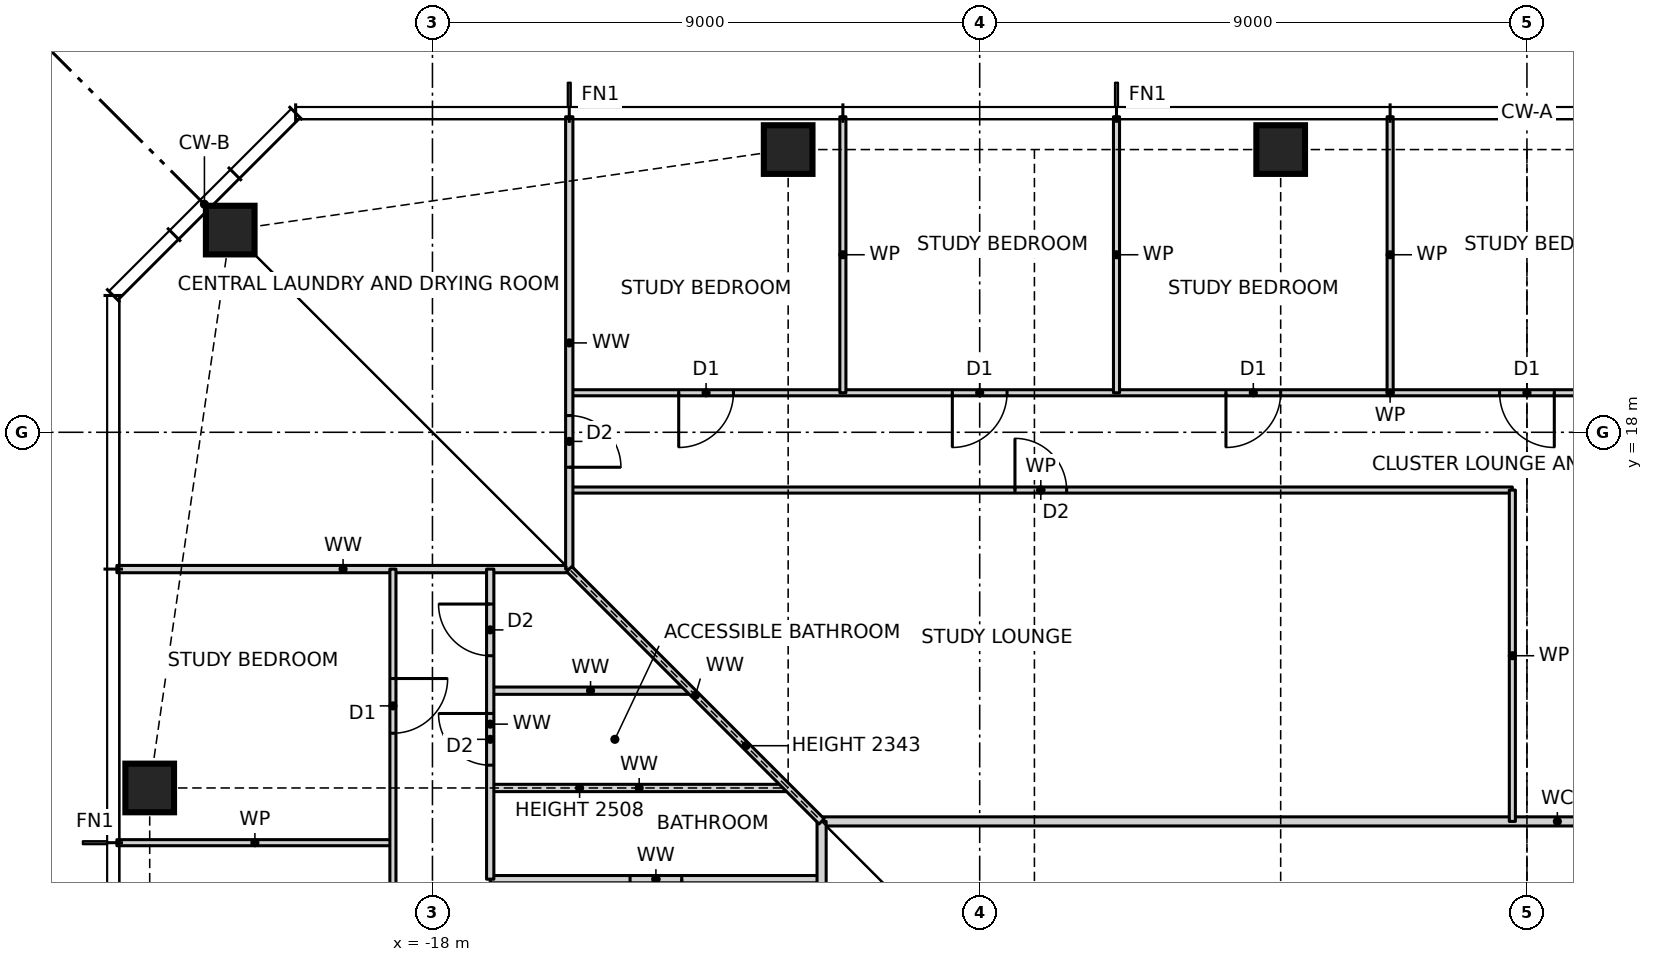
"""IFC4 building model, lengths in metres.
Left out: names, types, materials, properties, quantities, classifications, styles, units other than length and angle.
Written with IfcOpenShell. Run it as: python <this file> out.ifc"""

import sys

from ifc_helpers import new_model, si_unit, direction, frame, frame_2d, origin, origin_2d, place, context, subcontext, project, spatial, rectangle, hollow_rectangle, extrude, element, fill, save


model = new_model("IFC4")
c1 = context("Model", 3, precision=1e-05, world=origin(), true_north=direction((0.0, 1.0)))
c2 = subcontext(c1, "Body", "Model", "MODEL_VIEW")
j1 = project(units=[si_unit("LENGTHUNIT", "METRE"), si_unit("PLANEANGLEUNIT", "RADIAN")], contexts=[c1])
p1 = place(None, origin())
s1 = spatial("IfcSite", under=j1, at=p1, CompositionType="ELEMENT")
p2 = place(p1, origin())
s2 = spatial("IfcBuilding", under=s1, at=p2, CompositionType="ELEMENT")
p3 = place(p2, frame((0.0, 0.0, 29.0)))
s3 = spatial("IfcBuildingStorey", under=s2, at=p3, CompositionType="ELEMENT", Elevation=29.0)
for number, where, z_axis, x_axis in (
    (1, (-4.05, 22.65, 0.0), (0.0, 0.0, 1.0), (1.0, 0.0, 0.0)),
    (2, (-12.15, 22.65, 0.0), (0.0, 0.0, 1.0), (1.0, 0.0, 0.0)),
    (3, (-21.326, 21.326, 0.0), (0.0, 0.0, 1.0), (1.0, 0.0, 0.0)),
    (4, (-22.65, 12.15, 0.0), (0.0, 0.0, 1.0), (1.0, 0.0, 0.0)),
):
    element("IfcColumn", number, at=place(p3, frame(where, z_axis=z_axis, x_axis=x_axis)), inside=s3, PredefinedType="COLUMN", context=c2, shape_type="SweptSolid", body=[
        extrude(hollow_rectangle(XDim=0.8, YDim=0.8, WallThickness=0.09, at=origin_2d()), origin(), (0.0, 0.0, 1.0), 3.5),
    ])
p4 = place(p3, frame((-17.05, 10.65, 0.0), z_axis=(0.0, 0.0, 1.0), x_axis=(1.0, 0.0, 0.0)))
e5 = element("IfcWall", 5, at=p4, inside=s3, PredefinedType="PARTITIONING", context=c2, shape_type="SweptSolid", body=[
    extrude(rectangle(XDim=5.45, YDim=0.12, at=frame_2d((2.725, 0.0))), origin(), (0.0, 0.0, 1.0), 3.27),
])
p5 = place(p4, frame((2.3, 0.0, 0.0)))
e6 = element("IfcOpeningElement", 6, at=p5, cuts=e5, PredefinedType="OPENING", context=c2, shape_type="SweptSolid", body=[
    extrude(rectangle(XDim=0.85, YDim=2.1, at=frame_2d((0.425, 1.05))), frame((0.0, 0.07, 0.0), z_axis=(0.0, -1.0, 0.0), x_axis=(1.0, 0.0, 0.0)), (0.0, 0.0, 1.0), 0.14),
])
p6 = place(p3, frame((-23.19, 11.25, 0.0), z_axis=(0.0, 0.0, 1.0), x_axis=(1.0, 0.0, 0.0)))
e7 = element("IfcWall", 7, at=p6, inside=s3, PredefinedType="PARTITIONING", context=c2, shape_type="SweptSolid", body=[
    extrude(rectangle(XDim=4.54, YDim=0.1, at=frame_2d((2.27, 0.0))), origin(), (0.0, 0.0, 1.0), 3.27),
])
p7 = place(p3, frame((-11.6, 11.6, 0.0), z_axis=(0.0, 0.0, 1.0), x_axis=(1.0, 0.0, 0.0)))
e8 = element("IfcWall", 8, at=p7, inside=s3, PredefinedType="PARTITIONING", context=c2, shape_type="SweptSolid", body=[
    extrude(rectangle(XDim=24.2, YDim=0.15, at=frame_2d((12.1, 0.0))), origin(), (0.0, 0.0, 1.0), 3.27),
])
p8 = place(p7, frame((12.855, 0.0, 0.0)))
e9 = element("IfcOpeningElement", 9, at=p8, cuts=e8, PredefinedType="OPENING", context=c2, shape_type="SweptSolid", body=[
    extrude(rectangle(XDim=1.0, YDim=2.1, at=frame_2d((0.5, 1.05))), frame((0.0, 0.085, 0.0), z_axis=(0.0, -1.0, 0.0), x_axis=(1.0, 0.0, 0.0)), (0.0, 0.0, 1.0), 0.17),
])
p9 = place(p3, frame((-17.05, 12.15, 0.0), z_axis=(0.0, 0.0, 1.0), x_axis=(1.0, 0.0, 0.0)))
e10 = element("IfcWall", 10, at=p9, inside=s3, PredefinedType="PARTITIONING", context=c2, shape_type="SweptSolid", body=[
    extrude(rectangle(XDim=4.9, YDim=0.12, at=frame_2d((2.45, 0.0))), origin(), (0.0, 0.0, 1.0), 2.508),
])
p10 = place(p3, frame((-17.05, 13.75, 0.0), z_axis=(0.0, 0.0, 1.0), x_axis=(1.0, 0.0, 0.0)))
e11 = element("IfcWall", 11, at=p10, inside=s3, PredefinedType="PARTITIONING", context=c2, shape_type="SweptSolid", body=[
    extrude(rectangle(XDim=3.3, YDim=0.12, at=frame_2d((1.65, 0.0))), origin(), (0.0, 0.0, 1.0), 3.27),
])
p11 = place(p3, frame((-23.19, 15.75, 0.0), z_axis=(0.0, 0.0, 1.0), x_axis=(1.0, 0.0, 0.0)))
e12 = element("IfcWall", 12, at=p11, inside=s3, PredefinedType="PARTITIONING", context=c2, shape_type="SweptSolid", body=[
    extrude(rectangle(XDim=7.44, YDim=0.12, at=frame_2d((3.72, 0.0))), origin(), (0.0, 0.0, 1.0), 3.27),
])
p12 = place(p3, frame((-15.75, 17.05, 0.0), z_axis=(0.0, 0.0, 1.0), x_axis=(1.0, 0.0, 0.0)))
e13 = element("IfcWall", 13, at=p12, inside=s3, PredefinedType="PARTITIONING", context=c2, shape_type="SweptSolid", body=[
    extrude(rectangle(XDim=15.51, YDim=0.1, at=frame_2d((7.755, 0.0))), origin(), (0.0, 0.0, 1.0), 3.27),
])
p13 = place(p12, frame((7.33, 0.0, 0.0)))
e14 = element("IfcOpeningElement", 14, at=p13, cuts=e13, PredefinedType="OPENING", context=c2, shape_type="SweptSolid", body=[
    extrude(rectangle(XDim=0.85, YDim=2.1, at=frame_2d((0.425, 1.05))), frame((0.0, 0.06, 0.0), z_axis=(0.0, -1.0, 0.0), x_axis=(1.0, 0.0, 0.0)), (0.0, 0.0, 1.0), 0.12),
])
p14 = place(p3, frame((-15.75, 18.65, 0.0), z_axis=(0.0, 0.0, 1.0), x_axis=(1.0, 0.0, 0.0)))
e15 = element("IfcWall", 15, at=p14, inside=s3, PredefinedType="PARTITIONING", context=c2, shape_type="SweptSolid", body=[
    extrude(rectangle(XDim=27.0, YDim=0.1, at=frame_2d((13.5, 0.0))), origin(), (0.0, 0.0, 1.0), 3.27),
])
p15 = place(p14, frame((24.3, 0.0, 0.0)))
e16 = element("IfcOpeningElement", 16, at=p15, cuts=e15, PredefinedType="OPENING", context=c2, shape_type="SweptSolid", body=[
    extrude(rectangle(XDim=0.9, YDim=2.1, at=frame_2d((0.45, 1.05))), frame((0.0, 0.06, 0.0), z_axis=(0.0, -1.0, 0.0), x_axis=(1.0, 0.0, 0.0)), (0.0, 0.0, 1.0), 0.12),
])
p16 = place(p14, frame((19.8, 0.0, 0.0)))
e17 = element("IfcOpeningElement", 17, at=p16, cuts=e15, PredefinedType="OPENING", context=c2, shape_type="SweptSolid", body=[
    extrude(rectangle(XDim=0.9, YDim=2.1, at=frame_2d((0.45, 1.05))), frame((0.0, 0.06, 0.0), z_axis=(0.0, -1.0, 0.0), x_axis=(1.0, 0.0, 0.0)), (0.0, 0.0, 1.0), 0.12),
])
p17 = place(p14, frame((15.3, 0.0, 0.0)))
e18 = element("IfcOpeningElement", 18, at=p17, cuts=e15, PredefinedType="OPENING", context=c2, shape_type="SweptSolid", body=[
    extrude(rectangle(XDim=0.9, YDim=2.1, at=frame_2d((0.45, 1.05))), frame((0.0, 0.06, 0.0), z_axis=(0.0, -1.0, 0.0), x_axis=(1.0, 0.0, 0.0)), (0.0, 0.0, 1.0), 0.12),
])
p18 = place(p14, frame((10.8, 0.0, 0.0)))
e19 = element("IfcOpeningElement", 19, at=p18, cuts=e15, PredefinedType="OPENING", context=c2, shape_type="SweptSolid", body=[
    extrude(rectangle(XDim=0.9, YDim=2.1, at=frame_2d((0.45, 1.05))), frame((0.0, 0.06, 0.0), z_axis=(0.0, -1.0, 0.0), x_axis=(1.0, 0.0, 0.0)), (0.0, 0.0, 1.0), 0.12),
])
p19 = place(p14, frame((6.3, 0.0, 0.0)))
e20 = element("IfcOpeningElement", 20, at=p19, cuts=e15, PredefinedType="OPENING", context=c2, shape_type="SweptSolid", body=[
    extrude(rectangle(XDim=0.9, YDim=2.1, at=frame_2d((0.45, 1.05))), frame((0.0, 0.06, 0.0), z_axis=(0.0, -1.0, 0.0), x_axis=(1.0, 0.0, 0.0)), (0.0, 0.0, 1.0), 0.12),
])
p20 = place(p14, frame((1.8, 0.0, 0.0)))
e21 = element("IfcOpeningElement", 21, at=p20, cuts=e15, PredefinedType="OPENING", context=c2, shape_type="SweptSolid", body=[
    extrude(rectangle(XDim=0.9, YDim=2.1, at=frame_2d((0.45, 1.05))), frame((0.0, 0.06, 0.0), z_axis=(0.0, -1.0, 0.0), x_axis=(1.0, 0.0, 0.0)), (0.0, 0.0, 1.0), 0.12),
])
p21 = place(p3, frame((-0.24, 11.6, 0.0), z_axis=(0.0, 0.0, 1.0), x_axis=(0.0, 1.0, 0.0)))
e22 = element("IfcWall", 22, at=p21, inside=s3, PredefinedType="PARTITIONING", context=c2, shape_type="SweptSolid", body=[
    extrude(rectangle(XDim=5.45, YDim=0.1, at=frame_2d((2.725, 0.0))), origin(), (0.0, 0.0, 1.0), 3.27),
])
for number, where, z_axis, x_axis in (
    (23, (-2.25, 18.65, 0.0), (0.0, 0.0, 1.0), (0.0, 1.0, 0.0)),
    (24, (-6.75, 18.65, 0.0), (0.0, 0.0, 1.0), (0.0, 1.0, 0.0)),
    (25, (-11.25, 18.65, 0.0), (0.0, 0.0, 1.0), (0.0, 1.0, 0.0)),
):
    element("IfcWall", number, at=place(p3, frame(where, z_axis=z_axis, x_axis=x_axis)), inside=s3, PredefinedType="PARTITIONING", context=c2, shape_type="SweptSolid", body=[
        extrude(rectangle(XDim=4.54, YDim=0.1, at=frame_2d((2.27, 0.0))), origin(), (0.0, 0.0, 1.0), 3.27),
    ])
p22 = place(p3, frame((-11.6, -11.6, 0.0), z_axis=(0.0, 0.0, 1.0), x_axis=(0.0, 1.0, 0.0)))
e26 = element("IfcWall", 26, at=p22, inside=s3, PredefinedType="PARTITIONING", context=c2, shape_type="SweptSolid", body=[
    extrude(rectangle(XDim=23.2, YDim=0.15, at=frame_2d((11.6, 0.0))), origin(), (0.0, 0.0, 1.0), 3.27),
])
p23 = place(p22, frame((20.55, 0.0, 0.0)))
e27 = element("IfcOpeningElement", 27, at=p23, cuts=e26, PredefinedType="OPENING", context=c2, shape_type="SweptSolid", body=[
    extrude(rectangle(XDim=1.0, YDim=2.1, at=frame_2d((0.5, 1.05))), frame((0.0, 0.085, 0.0), z_axis=(0.0, -1.0, 0.0), x_axis=(1.0, 0.0, 0.0)), (0.0, 0.0, 1.0), 0.17),
])
p24 = place(p22, frame((18.5, 0.0, 0.0)))
e28 = element("IfcOpeningElement", 28, at=p24, cuts=e26, PredefinedType="OPENING", context=c2, shape_type="SweptSolid", body=[
    extrude(rectangle(XDim=0.9, YDim=2.1, at=frame_2d((0.45, 1.05))), frame((0.0, 0.085, 0.0), z_axis=(0.0, -1.0, 0.0), x_axis=(1.0, 0.0, 0.0)), (0.0, 0.0, 1.0), 0.17),
])
p25 = place(p3, frame((-15.75, 15.75, 0.0), z_axis=(0.0, 0.0, 1.0), x_axis=(0.0, 1.0, 0.0)))
e29 = element("IfcWall", 29, at=p25, inside=s3, PredefinedType="PARTITIONING", context=c2, shape_type="SweptSolid", body=[
    extrude(rectangle(XDim=7.44, YDim=0.12, at=frame_2d((3.72, 0.0))), origin(), (0.0, 0.0, 1.0), 3.27),
])
p26 = place(p25, frame((1.675, 0.0, 0.0)))
e30 = element("IfcOpeningElement", 30, at=p26, cuts=e29, PredefinedType="OPENING", context=c2, shape_type="SweptSolid", body=[
    extrude(rectangle(XDim=0.85, YDim=2.1, at=frame_2d((0.425, 1.05))), frame((0.0, 0.07, 0.0), z_axis=(0.0, -1.0, 0.0), x_axis=(1.0, 0.0, 0.0)), (0.0, 0.0, 1.0), 0.14),
])
p27 = place(p3, frame((-17.05, 10.65, 0.0), z_axis=(0.0, 0.0, 1.0), x_axis=(0.0, 1.0, 0.0)))
e31 = element("IfcWall", 31, at=p27, inside=s3, PredefinedType="PARTITIONING", context=c2, shape_type="SweptSolid", body=[
    extrude(rectangle(XDim=5.1, YDim=0.12, at=frame_2d((2.55, 0.0))), origin(), (0.0, 0.0, 1.0), 3.27),
])
p28 = place(p27, frame((3.675, 0.0, 0.0)))
e32 = element("IfcOpeningElement", 32, at=p28, cuts=e31, PredefinedType="OPENING", context=c2, shape_type="SweptSolid", body=[
    extrude(rectangle(XDim=0.85, YDim=2.1, at=frame_2d((0.425, 1.05))), frame((0.0, 0.07, 0.0), z_axis=(0.0, -1.0, 0.0), x_axis=(1.0, 0.0, 0.0)), (0.0, 0.0, 1.0), 0.14),
])
p29 = place(p27, frame((1.875, 0.0, 0.0)))
e33 = element("IfcOpeningElement", 33, at=p29, cuts=e31, PredefinedType="OPENING", context=c2, shape_type="SweptSolid", body=[
    extrude(rectangle(XDim=0.85, YDim=2.1, at=frame_2d((0.425, 1.05))), frame((0.0, 0.07, 0.0), z_axis=(0.0, -1.0, 0.0), x_axis=(1.0, 0.0, 0.0)), (0.0, 0.0, 1.0), 0.14),
])
p30 = place(p3, frame((-18.65, -15.75, 0.0), z_axis=(0.0, 0.0, 1.0), x_axis=(0.0, 1.0, 0.0)))
e34 = element("IfcWall", 34, at=p30, inside=s3, PredefinedType="PARTITIONING", context=c2, shape_type="SweptSolid", body=[
    extrude(rectangle(XDim=31.5, YDim=0.1, at=frame_2d((15.75, 0.0))), origin(), (0.0, 0.0, 1.0), 3.27),
])
p31 = place(p30, frame((28.8, 0.0, 0.0)))
e35 = element("IfcOpeningElement", 35, at=p31, cuts=e34, PredefinedType="OPENING", context=c2, shape_type="SweptSolid", body=[
    extrude(rectangle(XDim=0.9, YDim=2.1, at=frame_2d((0.45, 1.05))), frame((0.0, 0.06, 0.0), z_axis=(0.0, -1.0, 0.0), x_axis=(1.0, 0.0, 0.0)), (0.0, 0.0, 1.0), 0.12),
])
p32 = place(p30, frame((24.3, 0.0, 0.0)))
e36 = element("IfcOpeningElement", 36, at=p32, cuts=e34, PredefinedType="OPENING", context=c2, shape_type="SweptSolid", body=[
    extrude(rectangle(XDim=0.9, YDim=2.1, at=frame_2d((0.45, 1.05))), frame((0.0, 0.06, 0.0), z_axis=(0.0, -1.0, 0.0), x_axis=(1.0, 0.0, 0.0)), (0.0, 0.0, 1.0), 0.12),
])
p33 = place(p30, frame((19.8, 0.0, 0.0)))
e37 = element("IfcOpeningElement", 37, at=p33, cuts=e34, PredefinedType="OPENING", context=c2, shape_type="SweptSolid", body=[
    extrude(rectangle(XDim=0.9, YDim=2.1, at=frame_2d((0.45, 1.05))), frame((0.0, 0.06, 0.0), z_axis=(0.0, -1.0, 0.0), x_axis=(1.0, 0.0, 0.0)), (0.0, 0.0, 1.0), 0.12),
])
p34 = place(p30, frame((15.3, 0.0, 0.0)))
e38 = element("IfcOpeningElement", 38, at=p34, cuts=e34, PredefinedType="OPENING", context=c2, shape_type="SweptSolid", body=[
    extrude(rectangle(XDim=0.9, YDim=2.1, at=frame_2d((0.45, 1.05))), frame((0.0, 0.06, 0.0), z_axis=(0.0, -1.0, 0.0), x_axis=(1.0, 0.0, 0.0)), (0.0, 0.0, 1.0), 0.12),
])
p35 = place(p30, frame((10.8, 0.0, 0.0)))
e39 = element("IfcOpeningElement", 39, at=p35, cuts=e34, PredefinedType="OPENING", context=c2, shape_type="SweptSolid", body=[
    extrude(rectangle(XDim=0.9, YDim=2.1, at=frame_2d((0.45, 1.05))), frame((0.0, 0.06, 0.0), z_axis=(0.0, -1.0, 0.0), x_axis=(1.0, 0.0, 0.0)), (0.0, 0.0, 1.0), 0.12),
])
p36 = place(p30, frame((6.3, 0.0, 0.0)))
e40 = element("IfcOpeningElement", 40, at=p36, cuts=e34, PredefinedType="OPENING", context=c2, shape_type="SweptSolid", body=[
    extrude(rectangle(XDim=0.9, YDim=2.1, at=frame_2d((0.45, 1.05))), frame((0.0, 0.06, 0.0), z_axis=(0.0, -1.0, 0.0), x_axis=(1.0, 0.0, 0.0)), (0.0, 0.0, 1.0), 0.12),
])
p37 = place(p30, frame((1.8, 0.0, 0.0)))
e41 = element("IfcOpeningElement", 41, at=p37, cuts=e34, PredefinedType="OPENING", context=c2, shape_type="SweptSolid", body=[
    extrude(rectangle(XDim=0.9, YDim=2.1, at=frame_2d((0.45, 1.05))), frame((0.0, 0.06, 0.0), z_axis=(0.0, -1.0, 0.0), x_axis=(1.0, 0.0, 0.0)), (0.0, 0.0, 1.0), 0.12),
])
p38 = place(p3, frame((-11.6, 11.6, 0.0), z_axis=(0.0, 0.0, 1.0), x_axis=(-0.707106781187, 0.707106781187, 0.0)))
e42 = element("IfcWall", 42, at=p38, inside=s3, PredefinedType="PARTITIONING", context=c2, shape_type="SweptSolid", body=[
    extrude(rectangle(XDim=5.869, YDim=0.12, at=frame_2d((2.935, 0.0))), origin(), (0.0, 0.0, 1.0), 2.343),
])
p39 = place(p17, frame((0.9, 0.0, 0.0), z_axis=(0.0, 0.0, 1.0), x_axis=(-1.0, 0.0, 0.0)))
e43 = element("IfcDoor", 43, at=p39, inside=s3, OperationType="SINGLE_SWING_LEFT", PredefinedType="DOOR", context=c2, shape_type="SweptSolid", body=[
    extrude(rectangle(XDim=0.9, YDim=2.1, at=frame_2d((0.45, 1.05))), frame((0.0, 0.025, 0.0), z_axis=(0.0, -1.0, 0.0), x_axis=(1.0, 0.0, 0.0)), (0.0, 0.0, 1.0), 0.05),
])
fill(e18, e43)
p40 = place(p18, frame((0.9, 0.0, 0.0), z_axis=(0.0, 0.0, 1.0), x_axis=(-1.0, 0.0, 0.0)))
e44 = element("IfcDoor", 44, at=p40, inside=s3, OperationType="SINGLE_SWING_RIGHT", PredefinedType="DOOR", context=c2, shape_type="SweptSolid", body=[
    extrude(rectangle(XDim=0.9, YDim=2.1, at=frame_2d((0.45, 1.05))), frame((0.0, 0.025, 0.0), z_axis=(0.0, -1.0, 0.0), x_axis=(1.0, 0.0, 0.0)), (0.0, 0.0, 1.0), 0.05),
])
fill(e19, e44)
p41 = place(p19, frame((0.9, 0.0, 0.0), z_axis=(0.0, 0.0, 1.0), x_axis=(-1.0, 0.0, 0.0)))
e45 = element("IfcDoor", 45, at=p41, inside=s3, OperationType="SINGLE_SWING_RIGHT", PredefinedType="DOOR", context=c2, shape_type="SweptSolid", body=[
    extrude(rectangle(XDim=0.9, YDim=2.1, at=frame_2d((0.45, 1.05))), frame((0.0, 0.025, 0.0), z_axis=(0.0, -1.0, 0.0), x_axis=(1.0, 0.0, 0.0)), (0.0, 0.0, 1.0), 0.05),
])
fill(e20, e45)
p42 = place(p20, frame((0.9, 0.0, 0.0), z_axis=(0.0, 0.0, 1.0), x_axis=(-1.0, 0.0, 0.0)))
e46 = element("IfcDoor", 46, at=p42, inside=s3, OperationType="SINGLE_SWING_RIGHT", PredefinedType="DOOR", context=c2, shape_type="SweptSolid", body=[
    extrude(rectangle(XDim=0.9, YDim=2.1, at=frame_2d((0.45, 1.05))), frame((0.0, 0.025, 0.0), z_axis=(0.0, -1.0, 0.0), x_axis=(1.0, 0.0, 0.0)), (0.0, 0.0, 1.0), 0.05),
])
fill(e21, e46)
p43 = place(p13, origin())
e47 = element("IfcDoor", 47, at=p43, inside=s3, OperationType="SINGLE_SWING_LEFT", PredefinedType="DOOR", context=c2, shape_type="SweptSolid", body=[
    extrude(rectangle(XDim=0.85, YDim=2.1, at=frame_2d((0.425, 1.05))), frame((0.0, 0.025, 0.0), z_axis=(0.0, -1.0, 0.0), x_axis=(1.0, 0.0, 0.0)), (0.0, 0.0, 1.0), 0.05),
])
fill(e14, e47)
p44 = place(p31, frame((0.9, 0.0, 0.0), z_axis=(0.0, 0.0, 1.0), x_axis=(-1.0, 0.0, 0.0)))
e48 = element("IfcDoor", 48, at=p44, inside=s3, OperationType="SINGLE_SWING_LEFT", PredefinedType="DOOR", context=c2, shape_type="SweptSolid", body=[
    extrude(rectangle(XDim=0.9, YDim=2.1, at=frame_2d((0.45, 1.05))), frame((0.0, 0.025, 0.0), z_axis=(0.0, -1.0, 0.0), x_axis=(1.0, 0.0, 0.0)), (0.0, 0.0, 1.0), 0.05),
])
fill(e35, e48)
p45 = place(p28, origin())
e49 = element("IfcDoor", 49, at=p45, inside=s3, OperationType="SINGLE_SWING_RIGHT", PredefinedType="DOOR", context=c2, shape_type="SweptSolid", body=[
    extrude(rectangle(XDim=0.85, YDim=2.1, at=frame_2d((0.425, 1.05))), frame((0.0, 0.025, 0.0), z_axis=(0.0, -1.0, 0.0), x_axis=(1.0, 0.0, 0.0)), (0.0, 0.0, 1.0), 0.05),
])
fill(e32, e49)
p46 = place(p29, origin())
e50 = element("IfcDoor", 50, at=p46, inside=s3, OperationType="SINGLE_SWING_RIGHT", PredefinedType="DOOR", context=c2, shape_type="SweptSolid", body=[
    extrude(rectangle(XDim=0.85, YDim=2.1, at=frame_2d((0.425, 1.05))), frame((0.0, 0.025, 0.0), z_axis=(0.0, -1.0, 0.0), x_axis=(1.0, 0.0, 0.0)), (0.0, 0.0, 1.0), 0.05),
])
fill(e33, e50)
p47 = place(p5, frame((0.85, 0.0, 0.0), z_axis=(0.0, 0.0, 1.0), x_axis=(-1.0, 0.0, 0.0)))
e51 = element("IfcDoor", 51, at=p47, inside=s3, OperationType="SINGLE_SWING_LEFT", PredefinedType="DOOR", context=c2, shape_type="SweptSolid", body=[
    extrude(rectangle(XDim=0.85, YDim=2.1, at=frame_2d((0.425, 1.05))), frame((0.0, 0.025, 0.0), z_axis=(0.0, -1.0, 0.0), x_axis=(1.0, 0.0, 0.0)), (0.0, 0.0, 1.0), 0.05),
])
fill(e6, e51)
p48 = place(p26, frame((0.85, 0.0, 0.0), z_axis=(0.0, 0.0, 1.0), x_axis=(-1.0, 0.0, 0.0)))
e52 = element("IfcDoor", 52, at=p48, inside=s3, OperationType="SINGLE_SWING_RIGHT", PredefinedType="DOOR", context=c2, shape_type="SweptSolid", body=[
    extrude(rectangle(XDim=0.85, YDim=2.1, at=frame_2d((0.425, 1.05))), frame((0.0, 0.025, 0.0), z_axis=(0.0, -1.0, 0.0), x_axis=(1.0, 0.0, 0.0)), (0.0, 0.0, 1.0), 0.05),
])
fill(e30, e52)
save(model, sys.argv[1])
